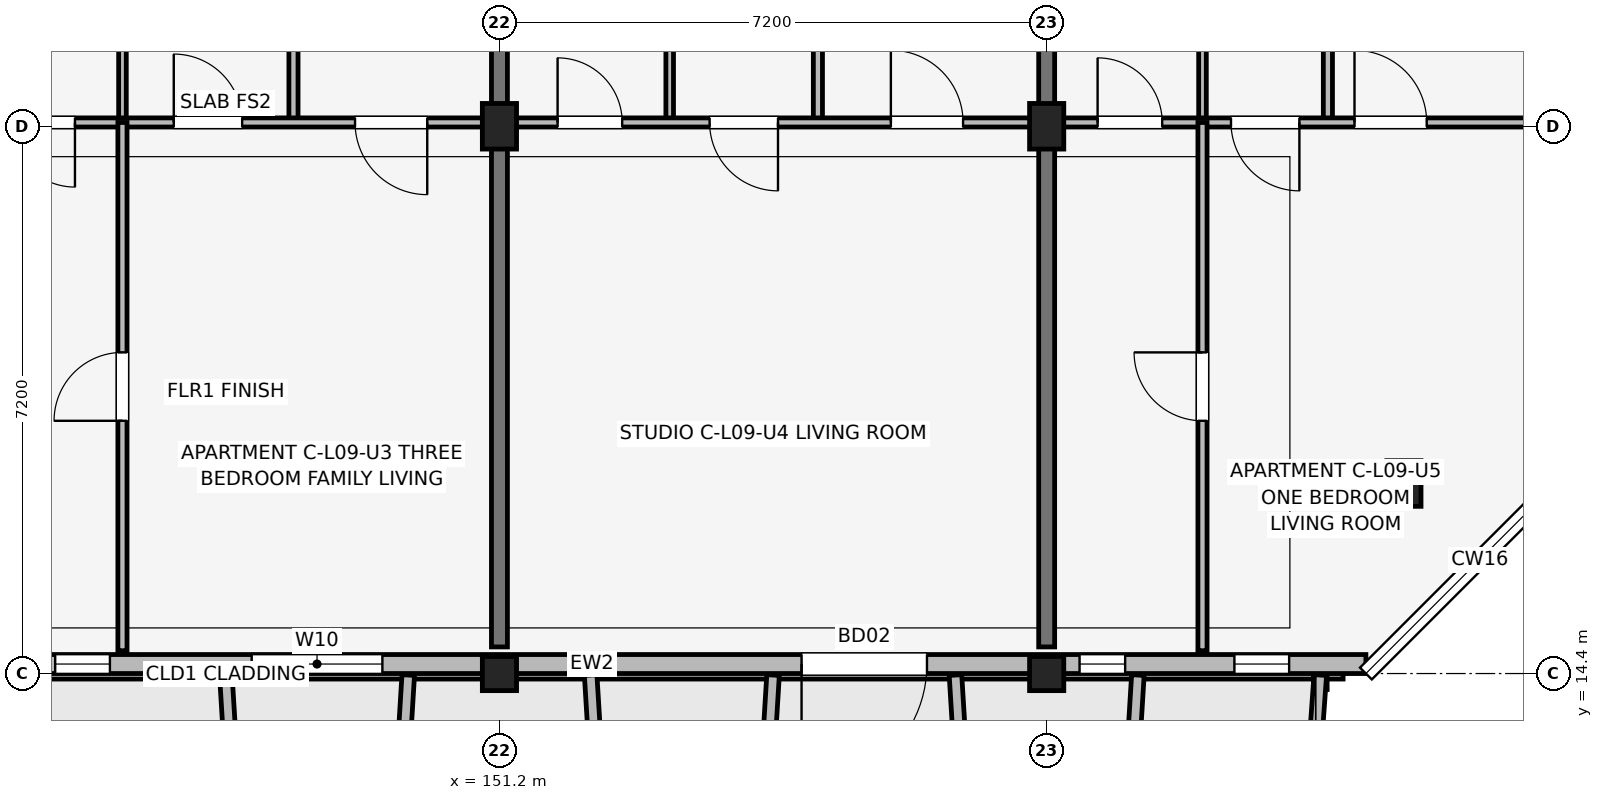
"""IFC4 building model, lengths in metres.
Left out: names, types, materials, properties, quantities, classifications, styles, units other than length and angle.
Written with IfcOpenShell. Run it as: python <this file> out.ifc"""

import sys

from ifc_helpers import new_model, si_unit, direction, frame, frame_2d, origin, origin_2d, place, context, subcontext, project, spatial, rectangle, extrude, element, fill, save


model = new_model("IFC4")
c1 = context("Model", 3, precision=1e-05, world=origin(), true_north=direction((0.0, 1.0)))
c2 = subcontext(c1, "Body", "Model", "MODEL_VIEW")
j1 = project(units=[si_unit("LENGTHUNIT", "METRE"), si_unit("PLANEANGLEUNIT", "RADIAN")], contexts=[c1])
p1 = place(None, origin())
s1 = spatial("IfcSite", under=j1, at=p1, CompositionType="ELEMENT")
p2 = place(p1, origin())
s2 = spatial("IfcBuilding", under=s1, at=p2, CompositionType="ELEMENT")
p3 = place(p2, frame((0.0, 0.0, 30.75)))
s3 = spatial("IfcBuildingStorey", under=s2, at=p3, CompositionType="ELEMENT", Elevation=30.75)
p4 = place(p3, frame((151.2, 14.4, 0.0), z_axis=(0.0, 0.0, 1.0), x_axis=(1.0, 0.0, 0.0)))
e1 = element("IfcColumn", 1, at=p4, inside=s3, PredefinedType="COLUMN", context=c2, shape_type="SweptSolid", body=[
    extrude(rectangle(XDim=0.45, YDim=0.45, at=origin_2d()), origin(), (0.0, 0.0, 1.0), 3.15),
])
p5 = place(p3, frame((151.2, 21.6, 0.0), z_axis=(0.0, 0.0, 1.0), x_axis=(1.0, 0.0, 0.0)))
e2 = element("IfcColumn", 2, at=p5, inside=s3, PredefinedType="COLUMN", context=c2, shape_type="SweptSolid", body=[
    extrude(rectangle(XDim=0.45, YDim=0.6, at=origin_2d()), origin(), (0.0, 0.0, 1.0), 3.15),
])
p6 = place(p3, frame((158.4, 14.4, 0.0), z_axis=(0.0, 0.0, 1.0), x_axis=(1.0, 0.0, 0.0)))
e3 = element("IfcColumn", 3, at=p6, inside=s3, PredefinedType="COLUMN", context=c2, shape_type="SweptSolid", body=[
    extrude(rectangle(XDim=0.45, YDim=0.45, at=origin_2d()), origin(), (0.0, 0.0, 1.0), 3.15),
])
for number, where, z_axis, x_axis in (
    (4, (158.4, 21.6, 0.0), (0.0, 0.0, 1.0), (1.0, 0.0, 0.0)),
    (5, (163.1, 16.9, 0.0), (0.0, 0.0, 1.0), (1.0, 0.0, 0.0)),
):
    element("IfcColumn", number, at=place(p3, frame(where, z_axis=z_axis, x_axis=x_axis)), inside=s3, PredefinedType="COLUMN", context=c2, shape_type="SweptSolid", body=[
        extrude(rectangle(XDim=0.45, YDim=0.6, at=origin_2d()), origin(), (0.0, 0.0, 1.0), 3.15),
    ])
for number, where, z_axis, x_axis in (
    (6, (151.2, 14.75, 0.0), (0.0, 0.0, 1.0), (0.0, 1.0, 0.0)),
    (7, (158.4, 14.75, 0.0), (0.0, 0.0, 1.0), (0.0, 1.0, 0.0)),
):
    element("IfcWall", number, at=place(p3, frame(where, z_axis=z_axis, x_axis=x_axis)), inside=s3, PredefinedType="SHEAR", context=c2, shape_type="SweptSolid", body=[
        extrude(rectangle(XDim=9.4, YDim=0.21, at=frame_2d((4.7, 0.0))), origin(), (0.0, 0.0, 1.0), 3.15),
    ])
p7 = place(p3, frame((132.6, 14.525, 0.0), z_axis=(0.0, 0.0, 1.0), x_axis=(1.0, 0.0, 0.0)))
e8 = element("IfcWall", 8, at=p7, inside=s3, PredefinedType="SOLIDWALL", context=c2, shape_type="SweptSolid", body=[
    extrude(rectangle(XDim=30.0, YDim=0.25, at=frame_2d((15.0, 0.0))), origin(), (0.0, 0.0, 1.0), 2.48),
])
p8 = place(p7, frame((9.9, 0.0, 0.0), z_axis=(0.0, 0.0, 1.0), x_axis=(-1.0, 0.0, 0.0)))
e9 = element("IfcOpeningElement", 9, at=p8, cuts=e8, PredefinedType="OPENING", context=c2, shape_type="SweptSolid", body=[
    extrude(rectangle(XDim=1.8, YDim=2.15, at=frame_2d((0.9, 1.075))), frame((0.0, 0.135, 0.0), z_axis=(0.0, -1.0, 0.0), x_axis=(1.0, 0.0, 0.0)), (0.0, 0.0, 1.0), 0.27),
])
p9 = place(p7, frame((24.225, 0.0, 0.0), z_axis=(0.0, 0.0, 1.0), x_axis=(-1.0, 0.0, 0.0)))
e10 = element("IfcOpeningElement", 10, at=p9, cuts=e8, PredefinedType="OPENING", context=c2, shape_type="SweptSolid", body=[
    extrude(rectangle(XDim=1.65, YDim=2.15, at=frame_2d((0.825, 1.075))), frame((0.0, 0.135, 0.0), z_axis=(0.0, -1.0, 0.0), x_axis=(1.0, 0.0, 0.0)), (0.0, 0.0, 1.0), 0.27),
])
p10 = place(p7, frame((0.77, 0.0, 0.7)))
e11 = element("IfcOpeningElement", 11, at=p10, cuts=e8, PredefinedType="OPENING", context=c2, shape_type="SweptSolid", body=[
    extrude(rectangle(XDim=1.46, YDim=1.55, at=frame_2d((0.73, 0.775))), frame((0.0, 0.135, 0.0), z_axis=(0.0, -1.0, 0.0), x_axis=(1.0, 0.0, 0.0)), (0.0, 0.0, 1.0), 0.27),
])
p11 = place(p7, frame((3.167, 0.0, 0.75)))
e12 = element("IfcOpeningElement", 12, at=p11, cuts=e8, PredefinedType="OPENING", context=c2, shape_type="SweptSolid", body=[
    extrude(rectangle(XDim=0.6, YDim=1.25, at=frame_2d((0.3, 0.625))), frame((0.0, 0.135, 0.0), z_axis=(0.0, -1.0, 0.0), x_axis=(1.0, 0.0, 0.0)), (0.0, 0.0, 1.0), 0.27),
])
p12 = place(p7, frame((5.555, 0.0, 0.75)))
e13 = element("IfcOpeningElement", 13, at=p12, cuts=e8, PredefinedType="OPENING", context=c2, shape_type="SweptSolid", body=[
    extrude(rectangle(XDim=0.72, YDim=1.35, at=frame_2d((0.36, 0.675))), frame((0.0, 0.135, 0.0), z_axis=(0.0, -1.0, 0.0), x_axis=(1.0, 0.0, 0.0)), (0.0, 0.0, 1.0), 0.27),
])
p13 = place(p7, frame((12.755, 0.0, 0.75)))
e14 = element("IfcOpeningElement", 14, at=p13, cuts=e8, PredefinedType="OPENING", context=c2, shape_type="SweptSolid", body=[
    extrude(rectangle(XDim=0.72, YDim=1.35, at=frame_2d((0.36, 0.675))), frame((0.0, 0.135, 0.0), z_axis=(0.0, -1.0, 0.0), x_axis=(1.0, 0.0, 0.0)), (0.0, 0.0, 1.0), 0.27),
])
p14 = place(p7, frame((15.34, 0.0, 0.7)))
e15 = element("IfcOpeningElement", 15, at=p14, cuts=e8, PredefinedType="OPENING", context=c2, shape_type="SweptSolid", body=[
    extrude(rectangle(XDim=1.72, YDim=1.6, at=frame_2d((0.86, 0.8))), frame((0.0, 0.135, 0.0), z_axis=(0.0, -1.0, 0.0), x_axis=(1.0, 0.0, 0.0)), (0.0, 0.0, 1.0), 0.27),
])
p15 = place(p7, frame((26.232, 0.0, 0.75)))
e16 = element("IfcOpeningElement", 16, at=p15, cuts=e8, PredefinedType="OPENING", context=c2, shape_type="SweptSolid", body=[
    extrude(rectangle(XDim=0.6, YDim=1.25, at=frame_2d((0.3, 0.625))), frame((0.0, 0.135, 0.0), z_axis=(0.0, -1.0, 0.0), x_axis=(1.0, 0.0, 0.0)), (0.0, 0.0, 1.0), 0.27),
])
p16 = place(p7, frame((28.27, 0.0, 0.75)))
e17 = element("IfcOpeningElement", 17, at=p16, cuts=e8, PredefinedType="OPENING", context=c2, shape_type="SweptSolid", body=[
    extrude(rectangle(XDim=0.72, YDim=1.35, at=frame_2d((0.36, 0.675))), frame((0.0, 0.135, 0.0), z_axis=(0.0, -1.0, 0.0), x_axis=(1.0, 0.0, 0.0)), (0.0, 0.0, 1.0), 0.27),
])
for number, where, z_axis, x_axis in (
    (18, (147.6, 14.38, 0.0), (0.0, 0.0, 1.0), (0.061, -0.998, 0.0)),
    (19, (150.0, 14.38, 0.0), (0.0, 0.0, 1.0), (-0.061, -0.998, 0.0)),
):
    element("IfcWall", number, at=place(p3, frame(where, z_axis=z_axis, x_axis=x_axis)), inside=s3, PredefinedType="ELEMENTEDWALL", context=c2, shape_type="SweptSolid", body=[
        extrude(rectangle(XDim=1.964, YDim=0.165, at=frame_2d((0.982, 0.0))), origin(), (0.0, 0.0, 1.0), 2.55),
    ])
for number, where, z_axis, x_axis in (
    (20, (152.4, 14.38, 0.0), (0.0, 0.0, 1.0), (0.061, -0.998, 0.0)),
    (21, (154.8, 14.38, 0.0), (0.0, 0.0, 1.0), (-0.061, -0.998, 0.0)),
    (22, (157.2, 14.38, 0.0), (0.0, 0.0, 1.0), (0.061, -0.998, 0.0)),
):
    element("IfcWall", number, at=place(p3, frame(where, z_axis=z_axis, x_axis=x_axis)), inside=s3, PredefinedType="ELEMENTEDWALL", context=c2, shape_type="SweptSolid", body=[
        extrude(rectangle(XDim=1.964, YDim=0.165, at=frame_2d((0.982, 0.0))), origin(), (0.0, 0.0, 1.0), 2.58),
    ])
p17 = place(p3, frame((159.6, 14.38, 0.0), z_axis=(0.0, 0.0, 1.0), x_axis=(-0.061170732449, -0.998127317276, 0.0)))
e23 = element("IfcWall", 23, at=p17, inside=s3, PredefinedType="ELEMENTEDWALL", context=c2, shape_type="SweptSolid", body=[
    extrude(rectangle(XDim=1.964, YDim=0.165, at=frame_2d((0.982, 0.0))), origin(), (0.0, 0.0, 1.0), 2.95),
])
p18 = place(p3, frame((162.0, 14.38, 0.0), z_axis=(0.0, 0.0, 1.0), x_axis=(-0.071194071069, -0.997462482625, 0.0)))
e24 = element("IfcWall", 24, at=p18, inside=s3, PredefinedType="ELEMENTEDWALL", context=c2, shape_type="SweptSolid", body=[
    extrude(rectangle(XDim=1.965, YDim=0.165, at=frame_2d((0.982, 0.0))), origin(), (0.0, 0.0, 1.0), 2.95),
])
p19 = place(p3, frame((146.24, 21.65, 0.0), z_axis=(0.0, 0.0, 1.0), x_axis=(0.0, 1.0, 0.0)))
e25 = element("IfcWall", 25, at=p19, inside=s3, PredefinedType="PARTITIONING", context=c2, shape_type="SweptSolid", body=[
    extrude(rectangle(XDim=2.65, YDim=0.1, at=frame_2d((1.325, 0.0))), origin(), (0.0, 0.0, 1.0), 2.38),
])
p20 = place(p3, frame((148.49, 21.65, 0.0), z_axis=(0.0, 0.0, 1.0), x_axis=(0.0, 1.0, 0.0)))
e26 = element("IfcWall", 26, at=p20, inside=s3, PredefinedType="PARTITIONING", context=c2, shape_type="SweptSolid", body=[
    extrude(rectangle(XDim=2.65, YDim=0.12, at=frame_2d((1.325, 0.0))), origin(), (0.0, 0.0, 1.0), 2.38),
])
p21 = place(p3, frame((144.14, 21.65, 0.0), z_axis=(0.0, 0.0, 1.0), x_axis=(1.0, 0.0, 0.0)))
e27 = element("IfcWall", 27, at=p21, inside=s3, PredefinedType="PARTITIONING", context=c2, shape_type="SweptSolid", body=[
    extrude(rectangle(XDim=6.92, YDim=0.12, at=frame_2d((3.46, 0.0))), origin(), (0.0, 0.0, 1.0), 2.38),
])
p22 = place(p21, frame((1.475, 0.0, 0.0), z_axis=(0.0, 0.0, 1.0), x_axis=(-1.0, 0.0, 0.0)))
e28 = element("IfcOpeningElement", 28, at=p22, cuts=e27, PredefinedType="OPENING", context=c2, shape_type="SweptSolid", body=[
    extrude(rectangle(XDim=0.85, YDim=2.08, at=frame_2d((0.425, 1.04))), frame((0.0, 0.07, 0.0), z_axis=(0.0, -1.0, 0.0), x_axis=(1.0, 0.0, 0.0)), (0.0, 0.0, 1.0), 0.14),
])
p23 = place(p21, frame((2.775, 0.0, 0.0)))
e29 = element("IfcOpeningElement", 29, at=p23, cuts=e27, PredefinedType="OPENING", context=c2, shape_type="SweptSolid", body=[
    extrude(rectangle(XDim=0.9, YDim=2.08, at=frame_2d((0.45, 1.04))), frame((0.0, 0.07, 0.0), z_axis=(0.0, -1.0, 0.0), x_axis=(1.0, 0.0, 0.0)), (0.0, 0.0, 1.0), 0.14),
])
p24 = place(p21, frame((6.11, 0.0, 0.0), z_axis=(0.0, 0.0, 1.0), x_axis=(-1.0, 0.0, 0.0)))
e30 = element("IfcOpeningElement", 30, at=p24, cuts=e27, PredefinedType="OPENING", context=c2, shape_type="SweptSolid", body=[
    extrude(rectangle(XDim=0.95, YDim=2.08, at=frame_2d((0.475, 1.04))), frame((0.0, 0.07, 0.0), z_axis=(0.0, -1.0, 0.0), x_axis=(1.0, 0.0, 0.0)), (0.0, 0.0, 1.0), 0.14),
])
p25 = place(p3, frame((146.24, 14.7, 0.0), z_axis=(0.0, 0.0, 1.0), x_axis=(0.0, 1.0, 0.0)))
e31 = element("IfcWall", 31, at=p25, inside=s3, PredefinedType="PARTITIONING", context=c2, shape_type="SweptSolid", body=[
    extrude(rectangle(XDim=6.95, YDim=0.12, at=frame_2d((3.475, 0.0))), origin(), (0.0, 0.0, 1.0), 2.38),
])
p26 = place(p25, frame((3.025, 0.0, 0.0)))
e32 = element("IfcOpeningElement", 32, at=p26, cuts=e31, PredefinedType="OPENING", context=c2, shape_type="SweptSolid", body=[
    extrude(rectangle(XDim=0.9, YDim=2.08, at=frame_2d((0.45, 1.04))), frame((0.0, 0.07, 0.0), z_axis=(0.0, -1.0, 0.0), x_axis=(1.0, 0.0, 0.0)), (0.0, 0.0, 1.0), 0.14),
])
p27 = place(p3, frame((153.44, 21.65, 0.0), z_axis=(0.0, 0.0, 1.0), x_axis=(0.0, 1.0, 0.0)))
e33 = element("IfcWall", 33, at=p27, inside=s3, PredefinedType="PARTITIONING", context=c2, shape_type="SweptSolid", body=[
    extrude(rectangle(XDim=2.65, YDim=0.1, at=frame_2d((1.325, 0.0))), origin(), (0.0, 0.0, 1.0), 2.38),
])
p28 = place(p3, frame((155.39, 21.65, 0.0), z_axis=(0.0, 0.0, 1.0), x_axis=(0.0, 1.0, 0.0)))
e34 = element("IfcWall", 34, at=p28, inside=s3, PredefinedType="PARTITIONING", context=c2, shape_type="SweptSolid", body=[
    extrude(rectangle(XDim=2.65, YDim=0.12, at=frame_2d((1.325, 0.0))), origin(), (0.0, 0.0, 1.0), 2.38),
])
p29 = place(p3, frame((151.34, 21.65, 0.0), z_axis=(0.0, 0.0, 1.0), x_axis=(1.0, 0.0, 0.0)))
e35 = element("IfcWall", 35, at=p29, inside=s3, PredefinedType="PARTITIONING", context=c2, shape_type="SweptSolid", body=[
    extrude(rectangle(XDim=6.92, YDim=0.12, at=frame_2d((3.46, 0.0))), origin(), (0.0, 0.0, 1.0), 2.38),
])
p30 = place(p29, frame((0.625, 0.0, 0.0)))
e36 = element("IfcOpeningElement", 36, at=p30, cuts=e35, PredefinedType="OPENING", context=c2, shape_type="SweptSolid", body=[
    extrude(rectangle(XDim=0.85, YDim=2.08, at=frame_2d((0.425, 1.04))), frame((0.0, 0.07, 0.0), z_axis=(0.0, -1.0, 0.0), x_axis=(1.0, 0.0, 0.0)), (0.0, 0.0, 1.0), 0.14),
])
p31 = place(p29, frame((3.525, 0.0, 0.0), z_axis=(0.0, 0.0, 1.0), x_axis=(-1.0, 0.0, 0.0)))
e37 = element("IfcOpeningElement", 37, at=p31, cuts=e35, PredefinedType="OPENING", context=c2, shape_type="SweptSolid", body=[
    extrude(rectangle(XDim=0.9, YDim=2.08, at=frame_2d((0.45, 1.04))), frame((0.0, 0.07, 0.0), z_axis=(0.0, -1.0, 0.0), x_axis=(1.0, 0.0, 0.0)), (0.0, 0.0, 1.0), 0.14),
])
p32 = place(p29, frame((5.01, 0.0, 0.0)))
e38 = element("IfcOpeningElement", 38, at=p32, cuts=e35, PredefinedType="OPENING", context=c2, shape_type="SweptSolid", body=[
    extrude(rectangle(XDim=0.95, YDim=2.08, at=frame_2d((0.475, 1.04))), frame((0.0, 0.07, 0.0), z_axis=(0.0, -1.0, 0.0), x_axis=(1.0, 0.0, 0.0)), (0.0, 0.0, 1.0), 0.14),
])
p33 = place(p3, frame((160.45, 21.65, 0.0), z_axis=(0.0, 0.0, 1.0), x_axis=(0.0, 1.0, 0.0)))
e39 = element("IfcWall", 39, at=p33, inside=s3, PredefinedType="PARTITIONING", context=c2, shape_type="SweptSolid", body=[
    extrude(rectangle(XDim=2.65, YDim=0.1, at=frame_2d((1.325, 0.0))), origin(), (0.0, 0.0, 1.0), 2.38),
])
p34 = place(p3, frame((162.1, 21.65, 0.0), z_axis=(0.0, 0.0, 1.0), x_axis=(0.0, 1.0, 0.0)))
e40 = element("IfcWall", 40, at=p34, inside=s3, PredefinedType="PARTITIONING", context=c2, shape_type="SweptSolid", body=[
    extrude(rectangle(XDim=2.65, YDim=0.12, at=frame_2d((1.325, 0.0))), origin(), (0.0, 0.0, 1.0), 2.38),
])
p35 = place(p3, frame((158.54, 21.65, 0.0), z_axis=(0.0, 0.0, 1.0), x_axis=(1.0, 0.0, 0.0)))
e41 = element("IfcWall", 41, at=p35, inside=s3, PredefinedType="PARTITIONING", context=c2, shape_type="SweptSolid", body=[
    extrude(rectangle(XDim=6.92, YDim=0.12, at=frame_2d((3.46, 0.0))), origin(), (0.0, 0.0, 1.0), 2.38),
])
p36 = place(p35, frame((0.53, 0.0, 0.0)))
e42 = element("IfcOpeningElement", 42, at=p36, cuts=e41, PredefinedType="OPENING", context=c2, shape_type="SweptSolid", body=[
    extrude(rectangle(XDim=0.85, YDim=2.08, at=frame_2d((0.425, 1.04))), frame((0.0, 0.07, 0.0), z_axis=(0.0, -1.0, 0.0), x_axis=(1.0, 0.0, 0.0)), (0.0, 0.0, 1.0), 0.14),
])
p37 = place(p35, frame((3.185, 0.0, 0.0), z_axis=(0.0, 0.0, 1.0), x_axis=(-1.0, 0.0, 0.0)))
e43 = element("IfcOpeningElement", 43, at=p37, cuts=e41, PredefinedType="OPENING", context=c2, shape_type="SweptSolid", body=[
    extrude(rectangle(XDim=0.9, YDim=2.08, at=frame_2d((0.45, 1.04))), frame((0.0, 0.07, 0.0), z_axis=(0.0, -1.0, 0.0), x_axis=(1.0, 0.0, 0.0)), (0.0, 0.0, 1.0), 0.14),
])
p38 = place(p35, frame((3.91, 0.0, 0.0)))
e44 = element("IfcOpeningElement", 44, at=p38, cuts=e41, PredefinedType="OPENING", context=c2, shape_type="SweptSolid", body=[
    extrude(rectangle(XDim=0.95, YDim=2.08, at=frame_2d((0.475, 1.04))), frame((0.0, 0.07, 0.0), z_axis=(0.0, -1.0, 0.0), x_axis=(1.0, 0.0, 0.0)), (0.0, 0.0, 1.0), 0.14),
])
p39 = place(p3, frame((160.45, 14.7, 0.0), z_axis=(0.0, 0.0, 1.0), x_axis=(0.0, 1.0, 0.0)))
e45 = element("IfcWall", 45, at=p39, inside=s3, PredefinedType="PARTITIONING", context=c2, shape_type="SweptSolid", body=[
    extrude(rectangle(XDim=6.95, YDim=0.12, at=frame_2d((3.475, 0.0))), origin(), (0.0, 0.0, 1.0), 2.38),
])
p40 = place(p39, frame((3.025, 0.0, 0.0)))
e46 = element("IfcOpeningElement", 46, at=p40, cuts=e45, PredefinedType="OPENING", context=c2, shape_type="SweptSolid", body=[
    extrude(rectangle(XDim=0.9, YDim=2.08, at=frame_2d((0.45, 1.04))), frame((0.0, 0.07, 0.0), z_axis=(0.0, -1.0, 0.0), x_axis=(1.0, 0.0, 0.0)), (0.0, 0.0, 1.0), 0.14),
])
p41 = place(p9, origin())
e47 = element("IfcDoor", 47, at=p41, inside=s3, OperationType="SINGLE_SWING_LEFT", PredefinedType="DOOR", context=c2, shape_type="SweptSolid", body=[
    extrude(rectangle(XDim=1.65, YDim=2.15, at=frame_2d((0.825, 1.075))), frame((0.0, 0.025, 0.0), z_axis=(0.0, -1.0, 0.0), x_axis=(1.0, 0.0, 0.0)), (0.0, 0.0, 1.0), 0.05),
])
fill(e10, e47)
p42 = place(p13, origin())
e48 = element("IfcWindow", 48, at=p42, inside=s3, PartitioningType="SINGLE_PANEL", PredefinedType="WINDOW", context=c2, shape_type="SweptSolid", body=[
    extrude(rectangle(XDim=0.72, YDim=1.35, at=frame_2d((0.36, 0.675))), frame((0.0, 0.03, 0.0), z_axis=(0.0, -1.0, 0.0), x_axis=(1.0, 0.0, 0.0)), (0.0, 0.0, 1.0), 0.06),
])
fill(e14, e48)
p43 = place(p14, origin())
e49 = element("IfcWindow", 49, at=p43, inside=s3, PartitioningType="SINGLE_PANEL", PredefinedType="WINDOW", context=c2, shape_type="SweptSolid", body=[
    extrude(rectangle(XDim=1.72, YDim=1.6, at=frame_2d((0.86, 0.8))), frame((0.0, 0.03, 0.0), z_axis=(0.0, -1.0, 0.0), x_axis=(1.0, 0.0, 0.0)), (0.0, 0.0, 1.0), 0.06),
])
fill(e15, e49)
p44 = place(p15, origin())
e50 = element("IfcWindow", 50, at=p44, inside=s3, PartitioningType="SINGLE_PANEL", PredefinedType="WINDOW", context=c2, shape_type="SweptSolid", body=[
    extrude(rectangle(XDim=0.6, YDim=1.25, at=frame_2d((0.3, 0.625))), frame((0.0, 0.03, 0.0), z_axis=(0.0, -1.0, 0.0), x_axis=(1.0, 0.0, 0.0)), (0.0, 0.0, 1.0), 0.06),
])
fill(e16, e50)
p45 = place(p16, origin())
e51 = element("IfcWindow", 51, at=p45, inside=s3, PartitioningType="SINGLE_PANEL", PredefinedType="WINDOW", context=c2, shape_type="SweptSolid", body=[
    extrude(rectangle(XDim=0.72, YDim=1.35, at=frame_2d((0.36, 0.675))), frame((0.0, 0.03, 0.0), z_axis=(0.0, -1.0, 0.0), x_axis=(1.0, 0.0, 0.0)), (0.0, 0.0, 1.0), 0.06),
])
fill(e17, e51)
p46 = place(p22, origin())
e52 = element("IfcDoor", 52, at=p46, inside=s3, OperationType="SINGLE_SWING_RIGHT", PredefinedType="DOOR", context=c2, shape_type="SweptSolid", body=[
    extrude(rectangle(XDim=0.85, YDim=2.08, at=frame_2d((0.425, 1.04))), frame((0.0, 0.025, 0.0), z_axis=(0.0, -1.0, 0.0), x_axis=(1.0, 0.0, 0.0)), (0.0, 0.0, 1.0), 0.05),
])
fill(e28, e52)
p47 = place(p23, origin())
e53 = element("IfcDoor", 53, at=p47, inside=s3, OperationType="SINGLE_SWING_LEFT", PredefinedType="DOOR", context=c2, shape_type="SweptSolid", body=[
    extrude(rectangle(XDim=0.9, YDim=2.08, at=frame_2d((0.45, 1.04))), frame((0.0, 0.025, 0.0), z_axis=(0.0, -1.0, 0.0), x_axis=(1.0, 0.0, 0.0)), (0.0, 0.0, 1.0), 0.05),
])
fill(e29, e53)
p48 = place(p24, origin())
e54 = element("IfcDoor", 54, at=p48, inside=s3, OperationType="SINGLE_SWING_RIGHT", PredefinedType="DOOR", context=c2, shape_type="SweptSolid", body=[
    extrude(rectangle(XDim=0.95, YDim=2.08, at=frame_2d((0.475, 1.04))), frame((0.0, 0.025, 0.0), z_axis=(0.0, -1.0, 0.0), x_axis=(1.0, 0.0, 0.0)), (0.0, 0.0, 1.0), 0.05),
])
fill(e30, e54)
p49 = place(p26, origin())
e55 = element("IfcDoor", 55, at=p49, inside=s3, OperationType="SINGLE_SWING_LEFT", PredefinedType="DOOR", context=c2, shape_type="SweptSolid", body=[
    extrude(rectangle(XDim=0.9, YDim=2.08, at=frame_2d((0.45, 1.04))), frame((0.0, 0.025, 0.0), z_axis=(0.0, -1.0, 0.0), x_axis=(1.0, 0.0, 0.0)), (0.0, 0.0, 1.0), 0.05),
])
fill(e32, e55)
p50 = place(p30, origin())
e56 = element("IfcDoor", 56, at=p50, inside=s3, OperationType="SINGLE_SWING_LEFT", PredefinedType="DOOR", context=c2, shape_type="SweptSolid", body=[
    extrude(rectangle(XDim=0.85, YDim=2.08, at=frame_2d((0.425, 1.04))), frame((0.0, 0.025, 0.0), z_axis=(0.0, -1.0, 0.0), x_axis=(1.0, 0.0, 0.0)), (0.0, 0.0, 1.0), 0.05),
])
fill(e36, e56)
p51 = place(p31, origin())
e57 = element("IfcDoor", 57, at=p51, inside=s3, OperationType="SINGLE_SWING_RIGHT", PredefinedType="DOOR", context=c2, shape_type="SweptSolid", body=[
    extrude(rectangle(XDim=0.9, YDim=2.08, at=frame_2d((0.45, 1.04))), frame((0.0, 0.025, 0.0), z_axis=(0.0, -1.0, 0.0), x_axis=(1.0, 0.0, 0.0)), (0.0, 0.0, 1.0), 0.05),
])
fill(e37, e57)
p52 = place(p32, origin())
e58 = element("IfcDoor", 58, at=p52, inside=s3, OperationType="SINGLE_SWING_LEFT", PredefinedType="DOOR", context=c2, shape_type="SweptSolid", body=[
    extrude(rectangle(XDim=0.95, YDim=2.08, at=frame_2d((0.475, 1.04))), frame((0.0, 0.025, 0.0), z_axis=(0.0, -1.0, 0.0), x_axis=(1.0, 0.0, 0.0)), (0.0, 0.0, 1.0), 0.05),
])
fill(e38, e58)
p53 = place(p36, origin())
e59 = element("IfcDoor", 59, at=p53, inside=s3, OperationType="SINGLE_SWING_LEFT", PredefinedType="DOOR", context=c2, shape_type="SweptSolid", body=[
    extrude(rectangle(XDim=0.85, YDim=2.08, at=frame_2d((0.425, 1.04))), frame((0.0, 0.025, 0.0), z_axis=(0.0, -1.0, 0.0), x_axis=(1.0, 0.0, 0.0)), (0.0, 0.0, 1.0), 0.05),
])
fill(e42, e59)
p54 = place(p37, origin())
e60 = element("IfcDoor", 60, at=p54, inside=s3, OperationType="SINGLE_SWING_RIGHT", PredefinedType="DOOR", context=c2, shape_type="SweptSolid", body=[
    extrude(rectangle(XDim=0.9, YDim=2.08, at=frame_2d((0.45, 1.04))), frame((0.0, 0.025, 0.0), z_axis=(0.0, -1.0, 0.0), x_axis=(1.0, 0.0, 0.0)), (0.0, 0.0, 1.0), 0.05),
])
fill(e43, e60)
p55 = place(p38, origin())
e61 = element("IfcDoor", 61, at=p55, inside=s3, OperationType="SINGLE_SWING_LEFT", PredefinedType="DOOR", context=c2, shape_type="SweptSolid", body=[
    extrude(rectangle(XDim=0.95, YDim=2.08, at=frame_2d((0.475, 1.04))), frame((0.0, 0.025, 0.0), z_axis=(0.0, -1.0, 0.0), x_axis=(1.0, 0.0, 0.0)), (0.0, 0.0, 1.0), 0.05),
])
fill(e44, e61)
p56 = place(p40, origin())
e62 = element("IfcDoor", 62, at=p56, inside=s3, OperationType="SINGLE_SWING_RIGHT", PredefinedType="DOOR", context=c2, shape_type="SweptSolid", body=[
    extrude(rectangle(XDim=0.9, YDim=2.08, at=frame_2d((0.45, 1.04))), frame((0.0, 0.025, 0.0), z_axis=(0.0, -1.0, 0.0), x_axis=(1.0, 0.0, 0.0)), (0.0, 0.0, 1.0), 0.05),
])
fill(e46, e62)
save(model, sys.argv[1])
